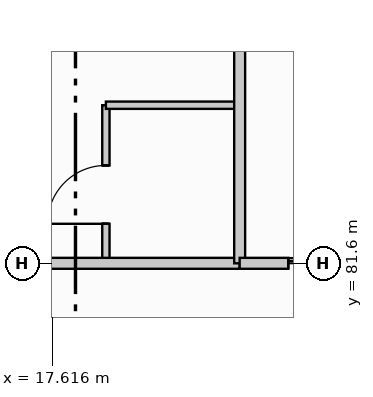
"""IFC4 building model, lengths in metres.
Left out: names, types, materials, properties, quantities, classifications, styles, units other than length and angle.
Written with IfcOpenShell. Run it as: python <this file> out.ifc"""

import sys

from ifc_helpers import new_model, si_unit, direction, frame, frame_2d, origin, place, context, subcontext, project, spatial, rectangle, extrude, element, fill, save


model = new_model("IFC4")
c1 = context("Model", 3, precision=1e-05, world=origin(), true_north=direction((0.0, 1.0)))
c2 = subcontext(c1, "Body", "Model", "MODEL_VIEW")
j1 = project(units=[si_unit("LENGTHUNIT", "METRE"), si_unit("PLANEANGLEUNIT", "RADIAN")], contexts=[c1])
p1 = place(None, origin())
s1 = spatial("IfcSite", under=j1, at=p1, CompositionType="ELEMENT")
p2 = place(p1, origin())
s2 = spatial("IfcBuilding", under=s1, at=p2, CompositionType="ELEMENT")
p3 = place(p2, frame((0.0, 0.0, 4.8)))
s3 = spatial("IfcBuildingStorey", under=s2, at=p3, CompositionType="ELEMENT", Elevation=4.8)
p4 = place(p3, frame((18.5, 81.6, 0.0), z_axis=(0.0, 0.0, 1.0), x_axis=(0.0, 1.0, 0.0)))
e1 = element("IfcWall", 1, at=p4, inside=s3, PredefinedType="PARTITIONING", context=c2, shape_type="SweptSolid", body=[
    extrude(rectangle(XDim=2.6, YDim=0.12, at=frame_2d((1.3, 0.0))), origin(), (0.0, 0.0, 1.0), 3.958),
])
p5 = place(p4, frame((0.65, 0.0, 0.0)))
e2 = element("IfcOpeningElement", 2, at=p5, cuts=e1, PredefinedType="OPENING", context=c2, shape_type="SweptSolid", body=[
    extrude(rectangle(XDim=0.96, YDim=2.06, at=frame_2d((0.48, 1.03))), frame((0.0, 0.07, 0.0), z_axis=(0.0, -1.0, 0.0), x_axis=(1.0, 0.0, 0.0)), (0.0, 0.0, 1.0), 0.14),
])
p6 = place(p3, frame((18.5, 84.2, 0.0), z_axis=(0.0, 0.0, 1.0), x_axis=(1.0, 0.0, 0.0)))
e3 = element("IfcWall", 3, at=p6, inside=s3, PredefinedType="PARTITIONING", context=c2, shape_type="SweptSolid", body=[
    extrude(rectangle(XDim=2.2, YDim=0.12, at=frame_2d((1.1, 0.0))), origin(), (0.0, 0.0, 1.0), 4.43),
])
p7 = place(p3, frame((10.5, 81.6, 0.0), z_axis=(0.0, 0.0, 1.0), x_axis=(1.0, 0.0, 0.0)))
e4 = element("IfcWall", 4, at=p7, inside=s3, PredefinedType="PARTITIONING", context=c2, shape_type="SweptSolid", body=[
    extrude(rectangle(XDim=10.2, YDim=0.18, at=frame_2d((5.1, 0.0))), origin(), (0.0, 0.0, 1.0), 3.465),
])
p8 = place(p7, frame((2.077, 0.0, 0.0)))
e5 = element("IfcOpeningElement", 5, at=p8, cuts=e4, PredefinedType="OPENING", context=c2, shape_type="SweptSolid", body=[
    extrude(rectangle(XDim=1.48, YDim=2.26, at=frame_2d((0.74, 1.13))), frame((0.0, 0.1, 0.0), z_axis=(0.0, -1.0, 0.0), x_axis=(1.0, 0.0, 0.0)), (0.0, 0.0, 1.0), 0.2),
])
p9 = place(p3, frame((20.7, 81.6, 0.0), z_axis=(0.0, 0.0, 1.0), x_axis=(0.0, 1.0, 0.0)))
e6 = element("IfcWall", 6, at=p9, inside=s3, PredefinedType="PARTITIONING", context=c2, shape_type="SweptSolid", body=[
    extrude(rectangle(XDim=44.1, YDim=0.18, at=frame_2d((22.05, 0.0))), origin(), (0.0, 0.0, 1.0), 3.465),
])
p10 = place(p3, frame((20.7, 81.6, 0.0), z_axis=(0.0, 0.0, 1.0), x_axis=(1.0, 0.0, 0.0)))
e7 = element("IfcWall", 7, at=p10, inside=s3, PredefinedType="PARTITIONING", context=c2, shape_type="SweptSolid", body=[
    extrude(rectangle(XDim=2.9, YDim=0.18, at=frame_2d((1.45, 0.0))), origin(), (0.0, 0.0, 1.0), 3.958),
])
p11 = place(p10, frame((0.8, 0.0, 0.0)))
e8 = element("IfcOpeningElement", 8, at=p11, cuts=e7, PredefinedType="OPENING", context=c2, shape_type="SweptSolid", body=[
    extrude(rectangle(XDim=1.48, YDim=2.26, at=frame_2d((0.74, 1.13))), frame((0.0, 0.1, 0.0), z_axis=(0.0, -1.0, 0.0), x_axis=(1.0, 0.0, 0.0)), (0.0, 0.0, 1.0), 0.2),
])
p12 = place(p5, origin())
e9 = element("IfcDoor", 9, at=p12, inside=s3, OperationType="SINGLE_SWING_LEFT", PredefinedType="DOOR", context=c2, shape_type="SweptSolid", body=[
    extrude(rectangle(XDim=0.96, YDim=2.06, at=frame_2d((0.48, 1.03))), frame((0.0, 0.025, 0.0), z_axis=(0.0, -1.0, 0.0), x_axis=(1.0, 0.0, 0.0)), (0.0, 0.0, 1.0), 0.05),
])
fill(e2, e9)
p13 = place(p11, origin())
e10 = element("IfcDoor", 10, at=p13, inside=s3, OperationType="SLIDING_TO_LEFT", PredefinedType="DOOR", context=c2, shape_type="SweptSolid", body=[
    extrude(rectangle(XDim=1.48, YDim=2.26, at=frame_2d((0.74, 1.13))), frame((0.0, 0.025, 0.0), z_axis=(0.0, -1.0, 0.0), x_axis=(1.0, 0.0, 0.0)), (0.0, 0.0, 1.0), 0.05),
])
fill(e8, e10)
save(model, sys.argv[1])
